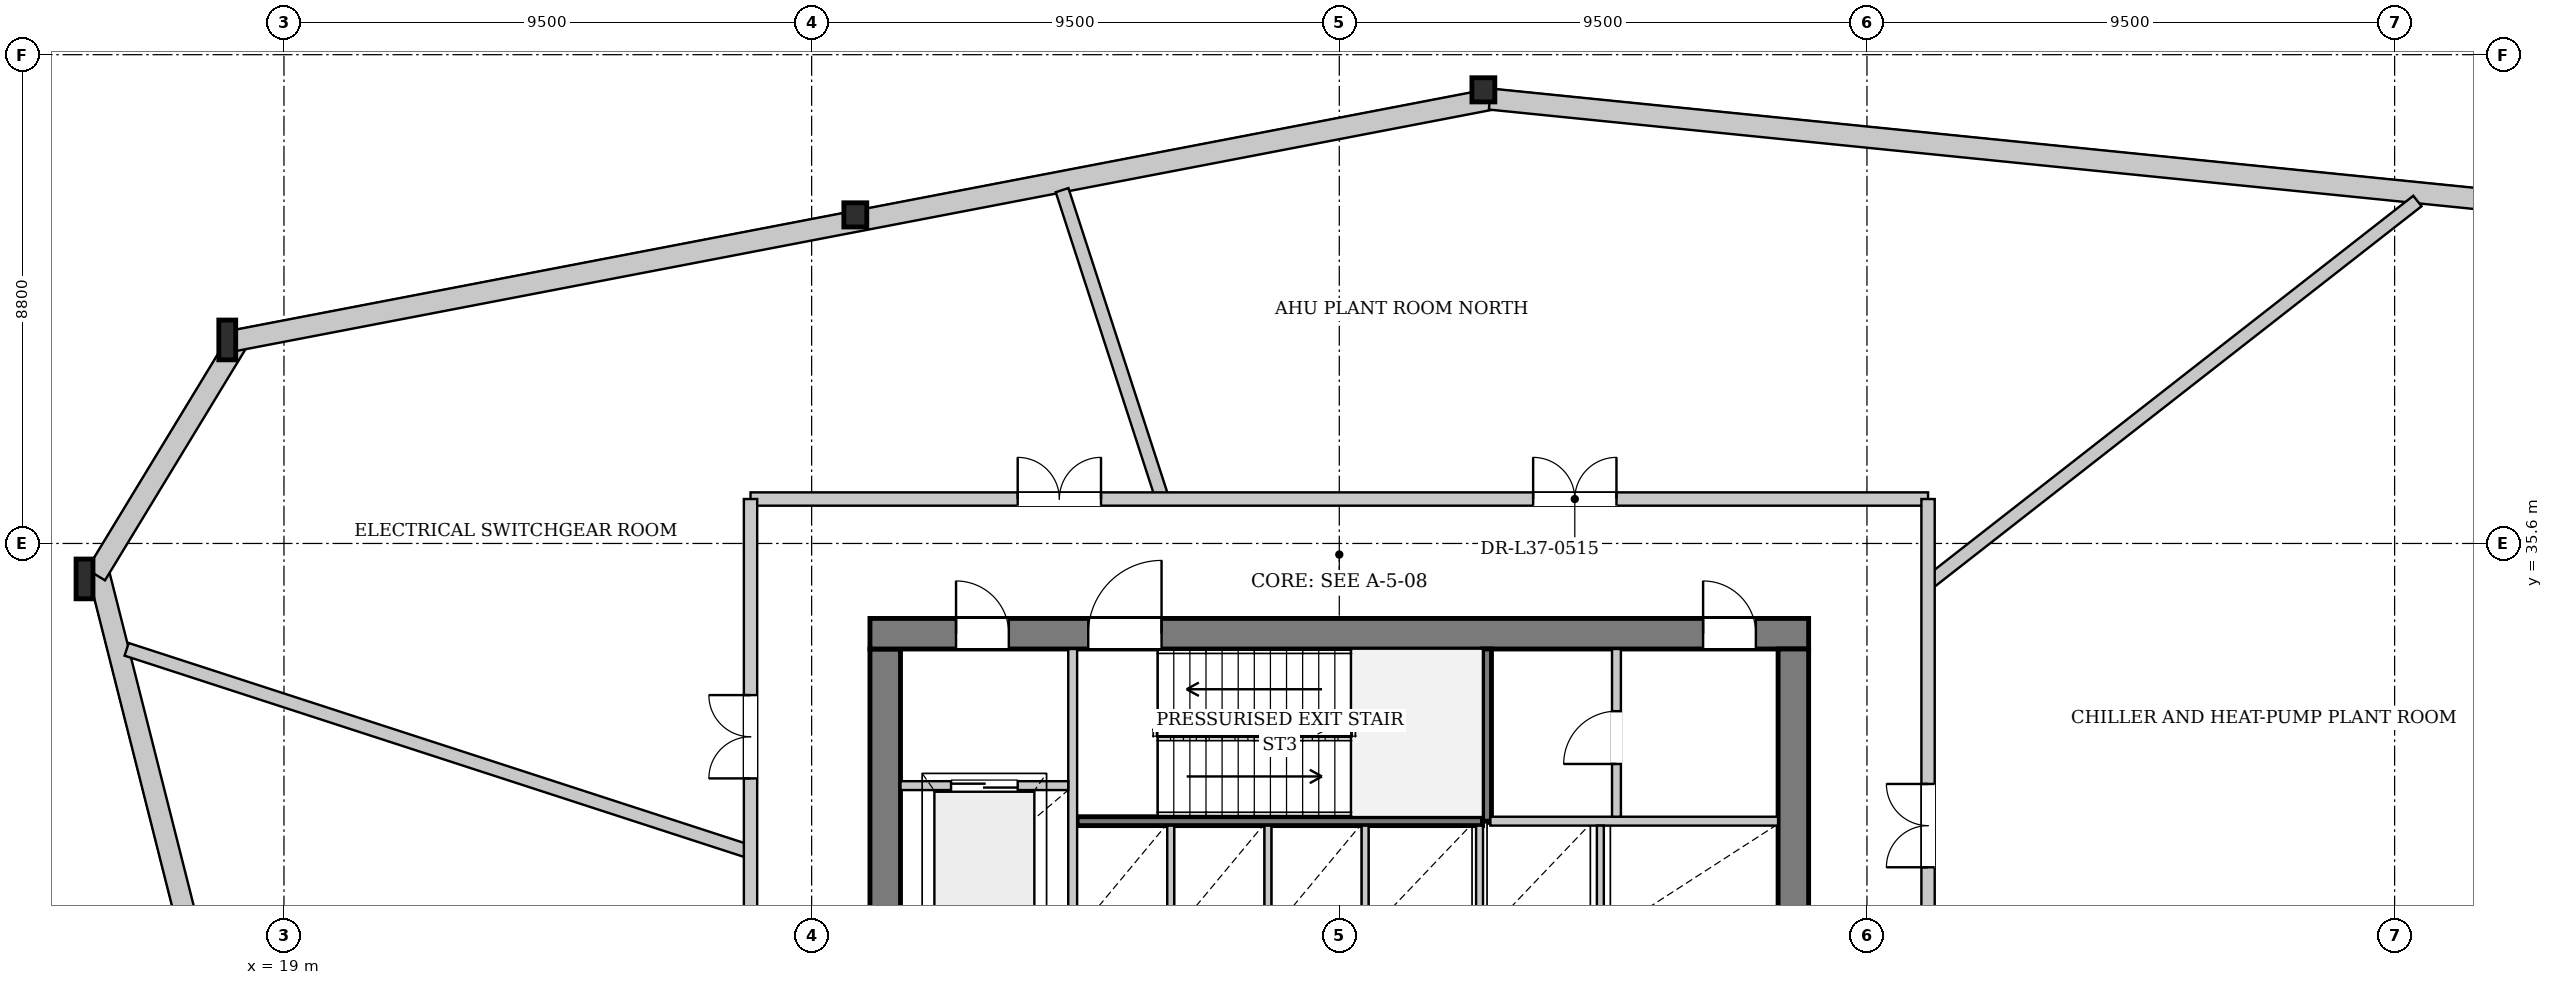
"""IFC4 building model, lengths in metres.
Left out: names, types, materials, properties, quantities, classifications, styles, units other than length and angle.
Written with IfcOpenShell. Run it as: python <this file> out.ifc"""

import sys

from ifc_helpers import new_model, si_unit, direction, frame, frame_2d, origin, origin_2d, place, context, subcontext, project, spatial, rectangle, i_section, extrude, source, transform, mapped, element, fill, save


model = new_model("IFC4")
c1 = context("Model", 3, precision=1e-05, world=origin(), true_north=direction((0.0, 1.0)))
c2 = subcontext(c1, "Body", "Model", "MODEL_VIEW")
j1 = project(units=[si_unit("LENGTHUNIT", "METRE"), si_unit("PLANEANGLEUNIT", "RADIAN")], contexts=[c1])
p1 = place(None, origin())
s1 = spatial("IfcSite", under=j1, at=p1, CompositionType="ELEMENT")
p2 = place(p1, origin())
s2 = spatial("IfcBuilding", under=s1, at=p2, CompositionType="ELEMENT")
p3 = place(p2, frame((0.0, 0.0, 142.1)))
s3 = spatial("IfcBuildingStorey", under=s2, at=p3, CompositionType="ELEMENT", Elevation=142.1)
m1 = source(origin(), c2, "Body", "SweptSolid", [
    extrude(i_section(OverallWidth=0.412, OverallDepth=0.435, WebThickness=0.031, FlangeThickness=0.05, at=origin_2d()), origin(), (0.0, 0.0, 1.0), 4.344),
])
p4 = place(p3, frame((40.731, 43.79, 0.0), z_axis=(-0.063172565414, -0.010566229802, 0.997946682828), x_axis=(0.164968142717, -0.986298895816, 0.0)))
e1 = element("IfcColumn", 1, at=p4, inside=s3, PredefinedType="COLUMN", context=c2, shape_type="MappedRepresentation", body=[
    mapped(m1, transform((0.0, 0.0, 0.0), x_axis=(1.0, 0.0, 0.0), y_axis=(0.0, 1.0, 0.0), z_axis=(0.0, 0.0, 1.0), scale=1.0)),
])
m2 = source(origin(), c2, "Body", "SweptSolid", [
    extrude(i_section(OverallWidth=0.412, OverallDepth=0.435, WebThickness=0.031, FlangeThickness=0.05, at=origin_2d()), origin(), (0.0, 0.0, 1.0), 4.345),
])
p5 = place(p3, frame((29.401, 41.615, 0.0), z_axis=(-0.052587081912, -0.045451868875, 0.997581438496), x_axis=(0.653914443662, -0.756568503422, 0.0)))
e2 = element("IfcColumn", 2, at=p5, inside=s3, PredefinedType="COLUMN", context=c2, shape_type="MappedRepresentation", body=[
    mapped(m2, transform((0.0, 0.0, 0.0), x_axis=(1.0, 0.0, 0.0), y_axis=(0.0, 1.0, 0.0), z_axis=(0.0, 0.0, 1.0), scale=1.0)),
])
m3 = source(origin(), c2, "Body", "SweptSolid", [
    extrude(i_section(OverallWidth=0.304, OverallDepth=0.716, WebThickness=0.021, FlangeThickness=0.04, at=origin_2d()), origin(), (0.0, 0.0, 1.0), 4.353),
])
p6 = place(p3, frame((18.071, 39.439, 0.0), z_axis=(-0.041953488824, -0.080261286775, 0.99589057161), x_axis=(0.886231222436, -0.463243154704, 0.0)))
e3 = element("IfcColumn", 3, at=p6, inside=s3, PredefinedType="COLUMN", context=c2, shape_type="MappedRepresentation", body=[
    mapped(m3, transform((0.0, 0.0, 0.0), x_axis=(1.0, 0.0, 0.0), y_axis=(0.0, 1.0, 0.0), z_axis=(0.0, 0.0, 1.0), scale=1.0)),
])
m4 = source(origin(), c2, "Body", "SweptSolid", [
    extrude(i_section(OverallWidth=0.304, OverallDepth=0.716, WebThickness=0.021, FlangeThickness=0.04, at=origin_2d()), origin(), (0.0, 0.0, 1.0), 4.349),
])
p7 = place(p3, frame((15.453, 35.133, 0.0), z_axis=(-0.020207174684, -0.079088636472, 0.996662760252), x_axis=(0.968875614487, -0.247548063318, 0.0)))
e4 = element("IfcColumn", 4, at=p7, inside=s3, PredefinedType="COLUMN", context=c2, shape_type="MappedRepresentation", body=[
    mapped(m4, transform((0.0, 0.0, 0.0), x_axis=(1.0, 0.0, 0.0), y_axis=(0.0, 1.0, 0.0), z_axis=(0.0, 0.0, 1.0), scale=1.0)),
])
p8 = place(p3, frame((20.052, 17.707, 0.0), z_axis=(0.0, 0.0, 1.0), x_axis=(-0.244973212106, 0.969529847581, 0.0)))
e5 = element("IfcWall", 5, at=p8, inside=s3, PredefinedType="SOLIDWALL", context=c2, shape_type="SweptSolid", body=[
    extrude(rectangle(XDim=18.022, YDim=0.38, at=frame_2d((9.011, 0.0))), origin(), (0.0, 0.0, 1.0), 3.642),
])
p9 = place(p3, frame((15.615, 35.035, 0.0), z_axis=(0.0, 0.0, 1.0), x_axis=(0.519474959346, 0.854485673731, 0.0)))
e6 = element("IfcWall", 6, at=p9, inside=s3, PredefinedType="SOLIDWALL", context=c2, shape_type="SweptSolid", body=[
    extrude(rectangle(XDim=5.039, YDim=0.38, at=frame_2d((2.519, 0.0))), origin(), (0.0, 0.0, 1.0), 3.642),
])
p10 = place(p3, frame((18.106, 39.252, 0.0), z_axis=(0.0, 0.0, 1.0), x_axis=(0.982058256353, 0.188577785352, 0.0)))
e7 = element("IfcWall", 7, at=p10, inside=s3, PredefinedType="SOLIDWALL", context=c2, shape_type="SweptSolid", body=[
    extrude(rectangle(XDim=23.074, YDim=0.38, at=frame_2d((11.537, 0.0))), origin(), (0.0, 0.0, 1.0), 3.642),
])
p11 = place(p3, frame((40.712, 43.601, 0.0), z_axis=(0.0, 0.0, 1.0), x_axis=(0.994945211236, -0.100419254326, 0.0)))
e8 = element("IfcWall", 8, at=p11, inside=s3, PredefinedType="SOLIDWALL", context=c2, shape_type="SweptSolid", body=[
    extrude(rectangle(XDim=23.075, YDim=0.38, at=frame_2d((11.537, 0.0))), origin(), (0.0, 0.0, 1.0), 3.642),
])
p12 = place(p3, frame((65.136, 38.313, 0.0), z_axis=(0.0, 0.0, 1.0), x_axis=(-0.529057237664, -0.84858614134, 0.0)))
e9 = element("IfcWall", 9, at=p12, inside=s3, PredefinedType="SOLIDWALL", context=c2, shape_type="SweptSolid", body=[
    extrude(rectangle(XDim=23.662, YDim=0.38, at=frame_2d((11.831, 0.0))), origin(), (0.0, 0.0, 1.0), 3.642),
])
p13 = place(p3, frame((29.825, 19.5, 0.0), z_axis=(0.0, 0.0, 1.0), x_axis=(0.0, 1.0, 0.0)))
e10 = element("IfcWall", 10, at=p13, inside=s3, PredefinedType="SHEAR", context=c2, shape_type="SweptSolid", body=[
    extrude(rectangle(XDim=14.2, YDim=0.55, at=frame_2d((7.1, 0.0))), origin(), (0.0, 0.0, 1.0), 4.25),
])
p14 = place(p13, frame((7.42, 0.0, 0.0)))
e11 = element("IfcOpeningElement", 11, at=p14, cuts=e10, PredefinedType="OPENING", context=c2, shape_type="SweptSolid", body=[
    extrude(rectangle(XDim=1.6, YDim=2.2, at=frame_2d((0.8, 1.1))), frame((0.0, 0.285, 0.0), z_axis=(0.0, -1.0, 0.0), x_axis=(1.0, 0.0, 0.0)), (0.0, 0.0, 1.0), 0.57),
])
p15 = place(p3, frame((29.55, 33.975, 0.0), z_axis=(0.0, 0.0, 1.0), x_axis=(1.0, 0.0, 0.0)))
e12 = element("IfcWall", 12, at=p15, inside=s3, PredefinedType="SHEAR", context=c2, shape_type="SweptSolid", body=[
    extrude(rectangle(XDim=16.9, YDim=0.55, at=frame_2d((8.45, 0.0))), origin(), (0.0, 0.0, 1.0), 4.25),
])
p16 = place(p15, frame((1.55, 0.0, 0.0)))
e13 = element("IfcOpeningElement", 13, at=p16, cuts=e12, PredefinedType="OPENING", context=c2, shape_type="SweptSolid", body=[
    extrude(rectangle(XDim=0.95, YDim=2.1, at=frame_2d((0.475, 1.05))), frame((0.0, 0.285, 0.0), z_axis=(0.0, -1.0, 0.0), x_axis=(1.0, 0.0, 0.0)), (0.0, 0.0, 1.0), 0.57),
])
p17 = place(p15, frame((3.93, 0.0, 0.0)))
e14 = element("IfcOpeningElement", 14, at=p17, cuts=e12, PredefinedType="OPENING", context=c2, shape_type="SweptSolid", body=[
    extrude(rectangle(XDim=1.32, YDim=2.2, at=frame_2d((0.66, 1.1))), frame((0.0, 0.285, 0.0), z_axis=(0.0, -1.0, 0.0), x_axis=(1.0, 0.0, 0.0)), (0.0, 0.0, 1.0), 0.57),
])
p18 = place(p15, frame((15.0, 0.0, 0.0)))
e15 = element("IfcOpeningElement", 15, at=p18, cuts=e12, PredefinedType="OPENING", context=c2, shape_type="SweptSolid", body=[
    extrude(rectangle(XDim=0.95, YDim=2.1, at=frame_2d((0.475, 1.05))), frame((0.0, 0.285, 0.0), z_axis=(0.0, -1.0, 0.0), x_axis=(1.0, 0.0, 0.0)), (0.0, 0.0, 1.0), 0.57),
])
p19 = place(p3, frame((46.175, 33.7, 0.0), z_axis=(0.0, 0.0, 1.0), x_axis=(0.0, -1.0, 0.0)))
e16 = element("IfcWall", 16, at=p19, inside=s3, PredefinedType="SHEAR", context=c2, shape_type="SweptSolid", body=[
    extrude(rectangle(XDim=14.2, YDim=0.55, at=frame_2d((7.1, 0.0))), origin(), (0.0, 0.0, 1.0), 4.25),
])
p20 = place(p19, frame((5.18, 0.0, 0.0)))
e17 = element("IfcOpeningElement", 17, at=p20, cuts=e16, PredefinedType="OPENING", context=c2, shape_type="SweptSolid", body=[
    extrude(rectangle(XDim=1.6, YDim=2.2, at=frame_2d((0.8, 1.1))), frame((0.0, 0.285, 0.0), z_axis=(0.0, -1.0, 0.0), x_axis=(1.0, 0.0, 0.0)), (0.0, 0.0, 1.0), 0.57),
])
p21 = place(p3, frame((33.28, 30.6, 0.0), z_axis=(0.0, 0.0, 1.0), x_axis=(1.0, 0.0, 0.0)))
e18 = element("IfcWall", 18, at=p21, inside=s3, PredefinedType="PARTITIONING", context=c2, shape_type="SweptSolid", body=[
    extrude(rectangle(XDim=7.3, YDim=0.16, at=frame_2d((3.65, 0.0))), origin(), (0.0, 0.0, 1.0), 4.25),
])
p22 = place(p3, frame((40.66, 30.6, 0.0), z_axis=(0.0, 0.0, 1.0), x_axis=(0.0, 1.0, 0.0)))
e19 = element("IfcWall", 19, at=p22, inside=s3, PredefinedType="PARTITIONING", context=c2, shape_type="SweptSolid", body=[
    extrude(rectangle(XDim=3.1, YDim=0.16, at=frame_2d((1.55, 0.0))), origin(), (0.0, 0.0, 1.0), 4.25),
])
p23 = place(p3, frame((33.2, 28.44, 0.0), z_axis=(0.0, 0.0, 1.0), x_axis=(0.0, 1.0, 0.0)))
e20 = element("IfcWall", 20, at=p23, inside=s3, PredefinedType="PARTITIONING", context=c2, shape_type="SweptSolid", body=[
    extrude(rectangle(XDim=5.26, YDim=0.16, at=frame_2d((2.63, 0.0))), origin(), (0.0, 0.0, 1.0), 4.25),
])
p24 = place(p3, frame((30.1, 31.24, 0.0), z_axis=(0.0, 0.0, 1.0), x_axis=(1.0, 0.0, 0.0)))
e21 = element("IfcWall", 21, at=p24, inside=s3, PredefinedType="PARTITIONING", context=c2, shape_type="SweptSolid", body=[
    extrude(rectangle(XDim=3.02, YDim=0.16, at=frame_2d((1.51, 0.0))), origin(), (0.0, 0.0, 1.0), 4.25),
])
p25 = place(p24, frame((0.91, 0.0, 0.0)))
e22 = element("IfcOpeningElement", 22, at=p25, cuts=e21, PredefinedType="OPENING", context=c2, shape_type="SweptSolid", body=[
    extrude(rectangle(XDim=1.2, YDim=2.2, at=frame_2d((0.6, 1.1))), frame((0.0, 0.09, 0.0), z_axis=(0.0, -1.0, 0.0), x_axis=(1.0, 0.0, 0.0)), (0.0, 0.0, 1.0), 0.18),
])
p26 = place(p3, frame((40.72, 30.6, 0.0), z_axis=(0.0, 0.0, 1.0), x_axis=(1.0, 0.0, 0.0)))
e23 = element("IfcWall", 23, at=p26, inside=s3, PredefinedType="PARTITIONING", context=c2, shape_type="SweptSolid", body=[
    extrude(rectangle(XDim=5.18, YDim=0.16, at=frame_2d((2.59, 0.0))), origin(), (0.0, 0.0, 1.0), 4.25),
])
for number, where, z_axis, x_axis in (
    (24, (34.965, 28.6, 0.0), (0.0, 0.0, 1.0), (0.0, 1.0, 0.0)),
    (25, (36.715, 28.6, 0.0), (0.0, 0.0, 1.0), (0.0, 1.0, 0.0)),
    (26, (38.465, 28.6, 0.0), (0.0, 0.0, 1.0), (0.0, 1.0, 0.0)),
    (27, (40.525, 28.6, 0.0), (0.0, 0.0, 1.0), (0.0, 1.0, 0.0)),
    (28, (42.7, 28.6, 0.0), (0.0, 0.0, 1.0), (0.0, 1.0, 0.0)),
):
    element("IfcWall", number, at=place(p3, frame(where, z_axis=z_axis, x_axis=x_axis)), inside=s3, PredefinedType="PARTITIONING", context=c2, shape_type="SweptSolid", body=[
        extrude(rectangle(XDim=1.92, YDim=0.125, at=frame_2d((0.96, 0.0))), origin(), (0.0, 0.0, 1.0), 4.25),
    ])
p27 = place(p3, frame((42.99, 30.68, 0.0), z_axis=(0.0, 0.0, 1.0), x_axis=(0.0, 1.0, 0.0)))
e29 = element("IfcWall", 29, at=p27, inside=s3, PredefinedType="PARTITIONING", context=c2, shape_type="SweptSolid", body=[
    extrude(rectangle(XDim=3.02, YDim=0.16, at=frame_2d((1.51, 0.0))), origin(), (0.0, 0.0, 1.0), 4.25),
])
p28 = place(p27, frame((0.95, 0.0, 0.0)))
e30 = element("IfcOpeningElement", 30, at=p28, cuts=e29, PredefinedType="OPENING", context=c2, shape_type="SweptSolid", body=[
    extrude(rectangle(XDim=0.95, YDim=2.1, at=frame_2d((0.475, 1.05))), frame((0.0, 0.09, 0.0), z_axis=(0.0, -1.0, 0.0), x_axis=(1.0, 0.0, 0.0)), (0.0, 0.0, 1.0), 0.18),
])
p29 = place(p3, frame((48.6, 34.882, 0.0), z_axis=(0.0, 0.0, 1.0), x_axis=(0.788011131686, 0.615660991406, 0.0)))
e31 = element("IfcWall", 31, at=p29, inside=s3, PredefinedType="PARTITIONING", context=c2, shape_type="SweptSolid", body=[
    extrude(rectangle(XDim=11.181, YDim=0.24, at=frame_2d((5.59, 0.0))), origin(), (0.0, 0.0, 1.0), 4.25),
])
p30 = place(p3, frame((34.816, 36.4, 0.0), z_axis=(0.0, 0.0, 1.0), x_axis=(-0.309041701123, 0.951048488231, 0.0)))
e32 = element("IfcWall", 32, at=p30, inside=s3, PredefinedType="PARTITIONING", context=c2, shape_type="SweptSolid", body=[
    extrude(rectangle(XDim=5.847, YDim=0.24, at=frame_2d((2.924, 0.0))), origin(), (0.0, 0.0, 1.0), 4.25),
])
p31 = place(p3, frame((27.4, 30.044, 0.0), z_axis=(0.0, 0.0, 1.0), x_axis=(-0.951055941483, 0.309018763459, 0.0)))
e33 = element("IfcWall", 33, at=p31, inside=s3, PredefinedType="PARTITIONING", context=c2, shape_type="SweptSolid", body=[
    extrude(rectangle(XDim=11.811, YDim=0.24, at=frame_2d((5.905, 0.0))), origin(), (0.0, 0.0, 1.0), 4.25),
])
p32 = place(p3, frame((27.4, 36.4, 0.0), z_axis=(0.0, 0.0, 1.0), x_axis=(1.0, 0.0, 0.0)))
e34 = element("IfcWall", 34, at=p32, inside=s3, PredefinedType="PARTITIONING", context=c2, shape_type="SweptSolid", body=[
    extrude(rectangle(XDim=21.2, YDim=0.24, at=frame_2d((10.6, 0.0))), origin(), (0.0, 0.0, 1.0), 4.25),
])
p33 = place(p32, frame((4.81, 0.0, 0.0)))
e35 = element("IfcOpeningElement", 35, at=p33, cuts=e34, PredefinedType="OPENING", context=c2, shape_type="SweptSolid", body=[
    extrude(rectangle(XDim=1.5, YDim=2.25, at=frame_2d((0.75, 1.125))), frame((0.0, 0.13, 0.0), z_axis=(0.0, -1.0, 0.0), x_axis=(1.0, 0.0, 0.0)), (0.0, 0.0, 1.0), 0.26),
])
p34 = place(p32, frame((14.09, 0.0, 0.0)))
e36 = element("IfcOpeningElement", 36, at=p34, cuts=e34, PredefinedType="OPENING", context=c2, shape_type="SweptSolid", body=[
    extrude(rectangle(XDim=1.5, YDim=2.25, at=frame_2d((0.75, 1.125))), frame((0.0, 0.13, 0.0), z_axis=(0.0, -1.0, 0.0), x_axis=(1.0, 0.0, 0.0)), (0.0, 0.0, 1.0), 0.26),
])
p35 = place(p3, frame((27.4, 16.8, 0.0), z_axis=(0.0, 0.0, 1.0), x_axis=(0.0, 1.0, 0.0)))
e37 = element("IfcWall", 37, at=p35, inside=s3, PredefinedType="PARTITIONING", context=c2, shape_type="SweptSolid", body=[
    extrude(rectangle(XDim=19.6, YDim=0.24, at=frame_2d((9.8, 0.0))), origin(), (0.0, 0.0, 1.0), 4.25),
])
p36 = place(p35, frame((5.13, 0.0, 0.0)))
e38 = element("IfcOpeningElement", 38, at=p36, cuts=e37, PredefinedType="OPENING", context=c2, shape_type="SweptSolid", body=[
    extrude(rectangle(XDim=1.5, YDim=2.25, at=frame_2d((0.75, 1.125))), frame((0.0, 0.13, 0.0), z_axis=(0.0, -1.0, 0.0), x_axis=(1.0, 0.0, 0.0)), (0.0, 0.0, 1.0), 0.26),
])
p37 = place(p35, frame((14.57, 0.0, 0.0)))
e39 = element("IfcOpeningElement", 39, at=p37, cuts=e37, PredefinedType="OPENING", context=c2, shape_type="SweptSolid", body=[
    extrude(rectangle(XDim=1.5, YDim=2.25, at=frame_2d((0.75, 1.125))), frame((0.0, 0.13, 0.0), z_axis=(0.0, -1.0, 0.0), x_axis=(1.0, 0.0, 0.0)), (0.0, 0.0, 1.0), 0.26),
])
p38 = place(p3, frame((48.6, 16.8, 0.0), z_axis=(0.0, 0.0, 1.0), x_axis=(0.0, 1.0, 0.0)))
e40 = element("IfcWall", 40, at=p38, inside=s3, PredefinedType="PARTITIONING", context=c2, shape_type="SweptSolid", body=[
    extrude(rectangle(XDim=19.6, YDim=0.24, at=frame_2d((9.8, 0.0))), origin(), (0.0, 0.0, 1.0), 4.25),
])
p39 = place(p38, frame((5.13, 0.0, 0.0)))
e41 = element("IfcOpeningElement", 41, at=p39, cuts=e40, PredefinedType="OPENING", context=c2, shape_type="SweptSolid", body=[
    extrude(rectangle(XDim=1.5, YDim=2.25, at=frame_2d((0.75, 1.125))), frame((0.0, 0.13, 0.0), z_axis=(0.0, -1.0, 0.0), x_axis=(1.0, 0.0, 0.0)), (0.0, 0.0, 1.0), 0.26),
])
p40 = place(p38, frame((12.97, 0.0, 0.0)))
e42 = element("IfcOpeningElement", 42, at=p40, cuts=e40, PredefinedType="OPENING", context=c2, shape_type="SweptSolid", body=[
    extrude(rectangle(XDim=1.5, YDim=2.25, at=frame_2d((0.75, 1.125))), frame((0.0, 0.13, 0.0), z_axis=(0.0, -1.0, 0.0), x_axis=(1.0, 0.0, 0.0)), (0.0, 0.0, 1.0), 0.26),
])
m5 = source(origin(), c2, "Body", "SweptSolid", [
    extrude(rectangle(XDim=0.95, YDim=2.1, at=frame_2d((0.475, 1.05))), frame((0.0, 0.025, 0.0), z_axis=(0.0, -1.0, 0.0), x_axis=(1.0, 0.0, 0.0)), (0.0, 0.0, 1.0), 0.05),
])
p41 = place(p16, origin())
e43 = element("IfcDoor", 43, at=p41, inside=s3, OperationType="SINGLE_SWING_LEFT", PredefinedType="DOOR", context=c2, shape_type="MappedRepresentation", body=[
    mapped(m5, transform((0.0, 0.0, 0.0), x_axis=(1.0, 0.0, 0.0), y_axis=(0.0, 1.0, 0.0), z_axis=(0.0, 0.0, 1.0), scale=1.0)),
])
fill(e13, e43)
m6 = source(origin(), c2, "Body", "SweptSolid", [
    extrude(rectangle(XDim=1.32, YDim=2.2, at=frame_2d((0.66, 1.1))), frame((0.0, 0.025, 0.0), z_axis=(0.0, -1.0, 0.0), x_axis=(1.0, 0.0, 0.0)), (0.0, 0.0, 1.0), 0.05),
])
p42 = place(p17, origin())
e44 = element("IfcDoor", 44, at=p42, inside=s3, OperationType="SINGLE_SWING_RIGHT", PredefinedType="DOOR", context=c2, shape_type="MappedRepresentation", body=[
    mapped(m6, transform((0.0, 0.0, 0.0), x_axis=(1.0, 0.0, 0.0), y_axis=(0.0, 1.0, 0.0), z_axis=(0.0, 0.0, 1.0), scale=1.0)),
])
fill(e14, e44)
m7 = source(origin(), c2, "Body", "SweptSolid", [
    extrude(rectangle(XDim=1.2, YDim=2.2, at=frame_2d((0.6, 1.1))), frame((0.0, 0.025, 0.0), z_axis=(0.0, -1.0, 0.0), x_axis=(1.0, 0.0, 0.0)), (0.0, 0.0, 1.0), 0.05),
])
p43 = place(p25, origin())
e45 = element("IfcDoor", 45, at=p43, inside=s3, OperationType="DOUBLE_DOOR_SLIDING", PredefinedType="DOOR", context=c2, shape_type="MappedRepresentation", body=[
    mapped(m7, transform((0.0, 0.0, 0.0), x_axis=(1.0, 0.0, 0.0), y_axis=(0.0, 1.0, 0.0), z_axis=(0.0, 0.0, 1.0), scale=1.0)),
])
fill(e22, e45)
p44 = place(p28, origin())
e46 = element("IfcDoor", 46, at=p44, inside=s3, OperationType="SINGLE_SWING_LEFT", PredefinedType="DOOR", context=c2, shape_type="MappedRepresentation", body=[
    mapped(m5, transform((0.0, 0.0, 0.0), x_axis=(1.0, 0.0, 0.0), y_axis=(0.0, 1.0, 0.0), z_axis=(0.0, 0.0, 1.0), scale=1.0)),
])
fill(e30, e46)
p45 = place(p18, origin())
e47 = element("IfcDoor", 47, at=p45, inside=s3, OperationType="SINGLE_SWING_LEFT", PredefinedType="DOOR", context=c2, shape_type="MappedRepresentation", body=[
    mapped(m5, transform((0.0, 0.0, 0.0), x_axis=(1.0, 0.0, 0.0), y_axis=(0.0, 1.0, 0.0), z_axis=(0.0, 0.0, 1.0), scale=1.0)),
])
fill(e15, e47)
m8 = source(origin(), c2, "Body", "SweptSolid", [
    extrude(rectangle(XDim=1.5, YDim=2.25, at=frame_2d((0.75, 1.125))), frame((0.0, 0.025, 0.0), z_axis=(0.0, -1.0, 0.0), x_axis=(1.0, 0.0, 0.0)), (0.0, 0.0, 1.0), 0.05),
])
p46 = place(p33, origin())
e48 = element("IfcDoor", 48, at=p46, inside=s3, OperationType="DOUBLE_DOOR_SINGLE_SWING", PredefinedType="DOOR", context=c2, shape_type="MappedRepresentation", body=[
    mapped(m8, transform((0.0, 0.0, 0.0), x_axis=(1.0, 0.0, 0.0), y_axis=(0.0, 1.0, 0.0), z_axis=(0.0, 0.0, 1.0), scale=1.0)),
])
fill(e35, e48)
p47 = place(p34, origin())
e49 = element("IfcDoor", 49, at=p47, inside=s3, OperationType="DOUBLE_DOOR_SINGLE_SWING", PredefinedType="DOOR", context=c2, shape_type="MappedRepresentation", body=[
    mapped(m8, transform((0.0, 0.0, 0.0), x_axis=(1.0, 0.0, 0.0), y_axis=(0.0, 1.0, 0.0), z_axis=(0.0, 0.0, 1.0), scale=1.0)),
])
fill(e36, e49)
p48 = place(p37, origin())
e50 = element("IfcDoor", 50, at=p48, inside=s3, OperationType="DOUBLE_DOOR_SINGLE_SWING", PredefinedType="DOOR", context=c2, shape_type="MappedRepresentation", body=[
    mapped(m8, transform((0.0, 0.0, 0.0), x_axis=(1.0, 0.0, 0.0), y_axis=(0.0, 1.0, 0.0), z_axis=(0.0, 0.0, 1.0), scale=1.0)),
])
fill(e39, e50)
p49 = place(p40, origin())
e51 = element("IfcDoor", 51, at=p49, inside=s3, OperationType="DOUBLE_DOOR_SINGLE_SWING", PredefinedType="DOOR", context=c2, shape_type="MappedRepresentation", body=[
    mapped(m8, transform((0.0, 0.0, 0.0), x_axis=(1.0, 0.0, 0.0), y_axis=(0.0, 1.0, 0.0), z_axis=(0.0, 0.0, 1.0), scale=1.0)),
])
fill(e42, e51)
save(model, sys.argv[1])
